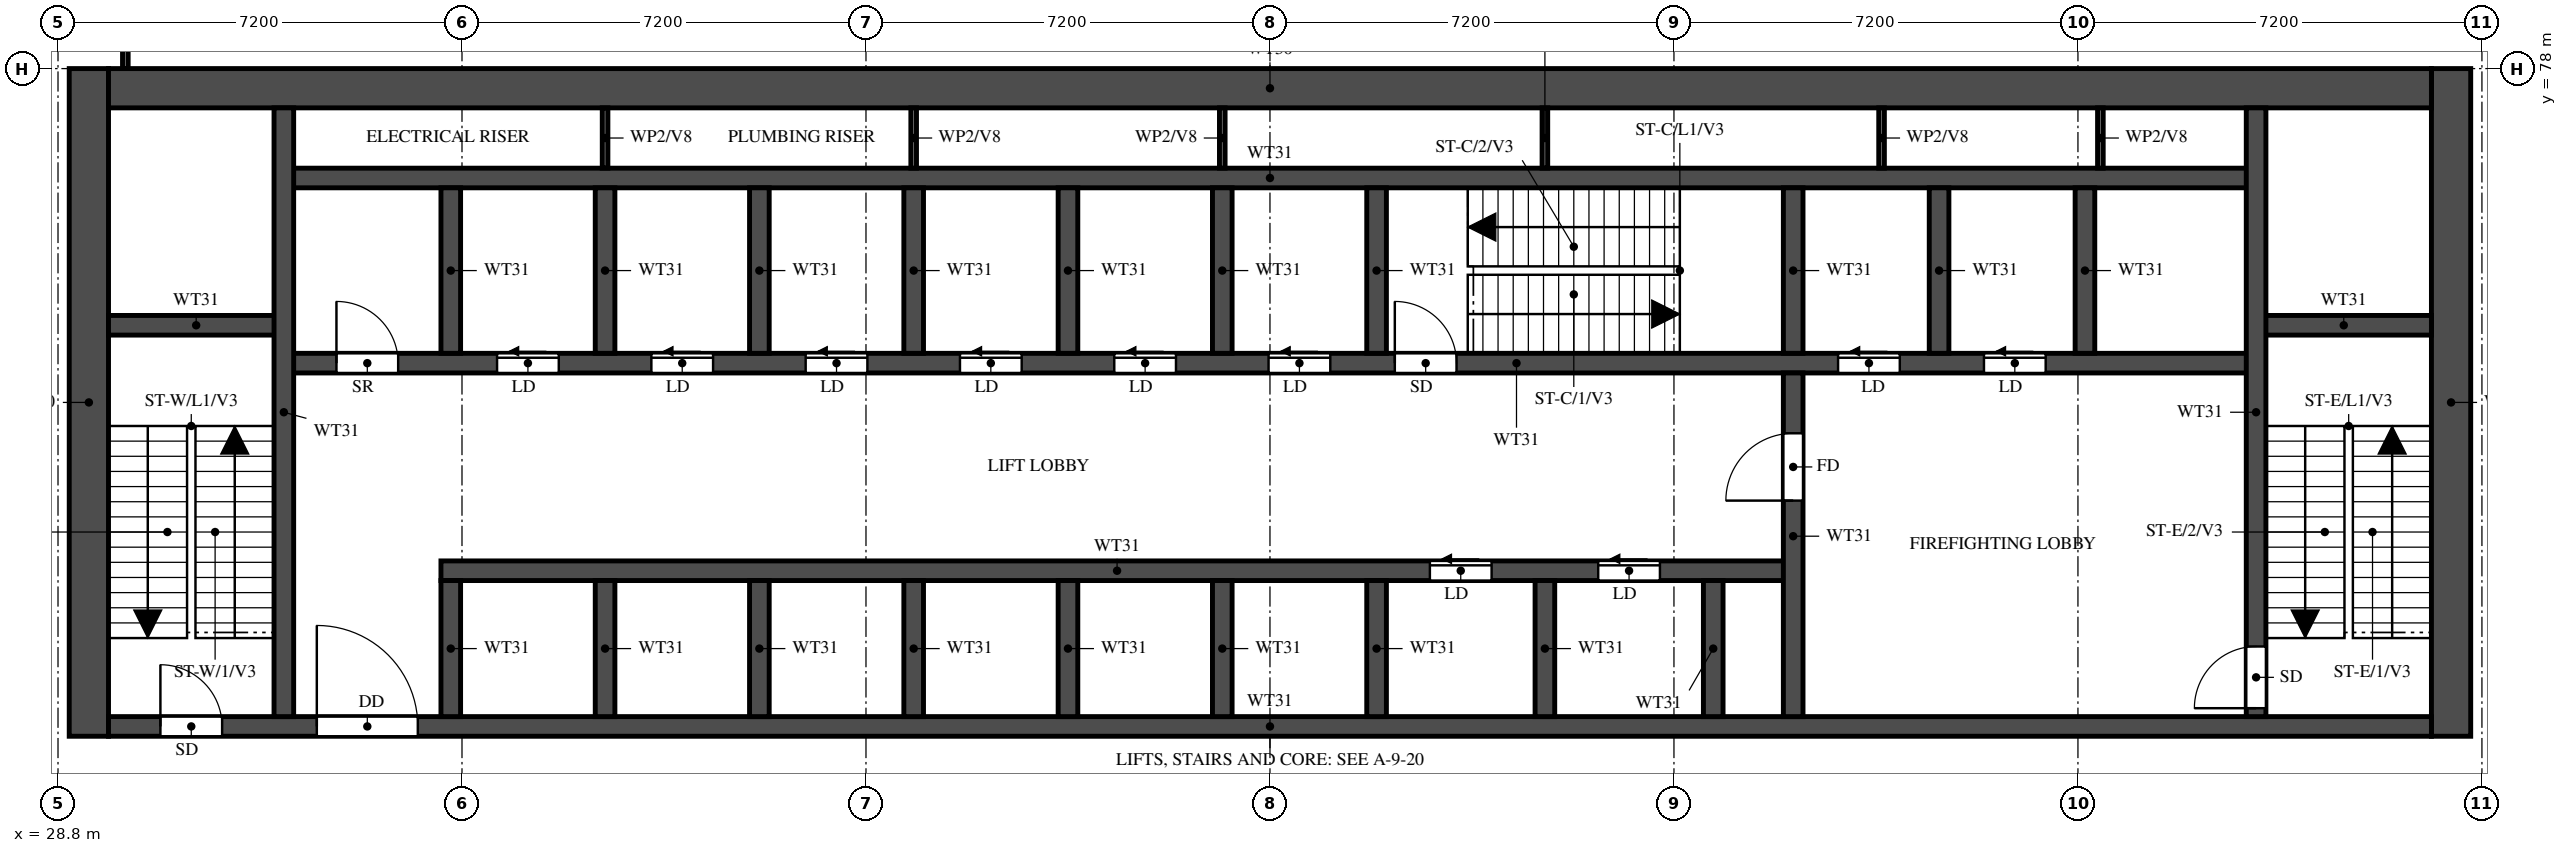
"""IFC4 building model, lengths in metres.
Left out: names, types, materials, properties, quantities, classifications, styles, units other than length and angle.
Written with IfcOpenShell. Run it as: python <this file> out.ifc"""

import sys

from ifc_helpers import new_model, si_unit, direction, frame, frame_2d, origin, place, context, subcontext, project, spatial, rectangle, extrude, element, fill, save


model = new_model("IFC4")
c1 = context("Model", 3, precision=1e-05, world=origin(), true_north=direction((0.0, 1.0)))
c2 = subcontext(c1, "Body", "Model", "MODEL_VIEW")
j1 = project(units=[si_unit("LENGTHUNIT", "METRE"), si_unit("PLANEANGLEUNIT", "RADIAN")], contexts=[c1])
p1 = place(None, origin())
s1 = spatial("IfcSite", under=j1, at=p1, CompositionType="ELEMENT")
p2 = place(p1, origin())
s2 = spatial("IfcBuilding", under=s1, at=p2, CompositionType="ELEMENT")
p3 = place(p2, frame((0.0, 0.0, 137.5)))
s3 = spatial("IfcBuildingStorey", under=s2, at=p3, CompositionType="ELEMENT", Elevation=137.5)
for number, where, z_axis, x_axis in (
    (1, (29.35, 66.1, 0.0), (0.0, 0.0, 1.0), (0.0, 1.0, 0.0)),
    (2, (71.45, 66.1, 0.0), (0.0, 0.0, 1.0), (0.0, 1.0, 0.0)),
):
    element("IfcWall", number, at=place(p3, frame(where, z_axis=z_axis, x_axis=x_axis)), inside=s3, PredefinedType="SHEAR", context=c2, shape_type="SweptSolid", body=[
        extrude(rectangle(XDim=11.9, YDim=0.7, at=frame_2d((5.95, 0.0))), origin(), (0.0, 0.0, 1.0), 5.2),
    ])
p4 = place(p3, frame((29.7, 77.65, 0.0), z_axis=(0.0, 0.0, 1.0), x_axis=(1.0, 0.0, 0.0)))
e3 = element("IfcWall", 3, at=p4, inside=s3, PredefinedType="SHEAR", context=c2, shape_type="SweptSolid", body=[
    extrude(rectangle(XDim=41.4, YDim=0.7, at=frame_2d((20.7, 0.0))), origin(), (0.0, 0.0, 1.0), 5.2),
])
p5 = place(p3, frame((29.7, 66.275, 0.0), z_axis=(0.0, 0.0, 1.0), x_axis=(1.0, 0.0, 0.0)))
e4 = element("IfcWall", 4, at=p5, inside=s3, PredefinedType="SHEAR", context=c2, shape_type="SweptSolid", body=[
    extrude(rectangle(XDim=41.4, YDim=0.35, at=frame_2d((20.7, 0.0))), origin(), (0.0, 0.0, 1.0), 5.2),
])
p6 = place(p5, frame((0.925, 0.0, 0.0)))
e5 = element("IfcOpeningElement", 5, at=p6, cuts=e4, PredefinedType="OPENING", context=c2, shape_type="SweptSolid", body=[
    extrude(rectangle(XDim=1.1, YDim=2.1, at=frame_2d((0.55, 1.05))), frame((0.0, 0.185, 0.0), z_axis=(0.0, -1.0, 0.0), x_axis=(1.0, 0.0, 0.0)), (0.0, 0.0, 1.0), 0.37),
])
p7 = place(p5, frame((3.712, 0.0, 0.0)))
e6 = element("IfcOpeningElement", 6, at=p7, cuts=e4, PredefinedType="OPENING", context=c2, shape_type="SweptSolid", body=[
    extrude(rectangle(XDim=1.8, YDim=2.1, at=frame_2d((0.9, 1.05))), frame((0.0, 0.185, 0.0), z_axis=(0.0, -1.0, 0.0), x_axis=(1.0, 0.0, 0.0)), (0.0, 0.0, 1.0), 0.37),
])
p8 = place(p3, frame((35.625, 69.05, 0.0), z_axis=(0.0, 0.0, 1.0), x_axis=(1.0, 0.0, 0.0)))
e7 = element("IfcWall", 7, at=p8, inside=s3, PredefinedType="SHEAR", context=c2, shape_type="SweptSolid", body=[
    extrude(rectangle(XDim=24.1, YDim=0.35, at=frame_2d((12.05, 0.0))), origin(), (0.0, 0.0, 1.0), 5.2),
])
p9 = place(p8, frame((17.625, 0.0, 0.0)))
e8 = element("IfcOpeningElement", 8, at=p9, cuts=e7, PredefinedType="OPENING", context=c2, shape_type="SweptSolid", body=[
    extrude(rectangle(XDim=1.1, YDim=2.1, at=frame_2d((0.55, 1.05))), frame((0.0, 0.185, 0.0), z_axis=(0.0, -1.0, 0.0), x_axis=(1.0, 0.0, 0.0)), (0.0, 0.0, 1.0), 0.37),
])
p10 = place(p8, frame((20.625, 0.0, 0.0)))
e9 = element("IfcOpeningElement", 9, at=p10, cuts=e7, PredefinedType="OPENING", context=c2, shape_type="SweptSolid", body=[
    extrude(rectangle(XDim=1.1, YDim=2.1, at=frame_2d((0.55, 1.05))), frame((0.0, 0.185, 0.0), z_axis=(0.0, -1.0, 0.0), x_axis=(1.0, 0.0, 0.0)), (0.0, 0.0, 1.0), 0.37),
])
p11 = place(p3, frame((32.825, 72.75, 0.0), z_axis=(0.0, 0.0, 1.0), x_axis=(1.0, 0.0, 0.0)))
e10 = element("IfcWall", 10, at=p11, inside=s3, PredefinedType="SHEAR", context=c2, shape_type="SweptSolid", body=[
    extrude(rectangle(XDim=35.15, YDim=0.35, at=frame_2d((17.575, 0.0))), origin(), (0.0, 0.0, 1.0), 5.2),
])
p12 = place(p11, frame((19.8, 0.0, 0.0)))
e11 = element("IfcOpeningElement", 11, at=p12, cuts=e10, PredefinedType="OPENING", context=c2, shape_type="SweptSolid", body=[
    extrude(rectangle(XDim=1.1, YDim=2.1, at=frame_2d((0.55, 1.05))), frame((0.0, 0.185, 0.0), z_axis=(0.0, -1.0, 0.0), x_axis=(1.0, 0.0, 0.0)), (0.0, 0.0, 1.0), 0.37),
])
p13 = place(p11, frame((27.7, 0.0, 0.0)))
e12 = element("IfcOpeningElement", 12, at=p13, cuts=e10, PredefinedType="OPENING", context=c2, shape_type="SweptSolid", body=[
    extrude(rectangle(XDim=1.1, YDim=2.1, at=frame_2d((0.55, 1.05))), frame((0.0, 0.185, 0.0), z_axis=(0.0, -1.0, 0.0), x_axis=(1.0, 0.0, 0.0)), (0.0, 0.0, 1.0), 0.37),
])
p14 = place(p11, frame((30.3, 0.0, 0.0)))
e13 = element("IfcOpeningElement", 13, at=p14, cuts=e10, PredefinedType="OPENING", context=c2, shape_type="SweptSolid", body=[
    extrude(rectangle(XDim=1.1, YDim=2.1, at=frame_2d((0.55, 1.05))), frame((0.0, 0.185, 0.0), z_axis=(0.0, -1.0, 0.0), x_axis=(1.0, 0.0, 0.0)), (0.0, 0.0, 1.0), 0.37),
])
p15 = place(p11, frame((3.8, 0.0, 0.0)))
e14 = element("IfcOpeningElement", 14, at=p15, cuts=e10, PredefinedType="OPENING", context=c2, shape_type="SweptSolid", body=[
    extrude(rectangle(XDim=1.1, YDim=2.1, at=frame_2d((0.55, 1.05))), frame((0.0, 0.185, 0.0), z_axis=(0.0, -1.0, 0.0), x_axis=(1.0, 0.0, 0.0)), (0.0, 0.0, 1.0), 0.37),
])
p16 = place(p11, frame((6.55, 0.0, 0.0)))
e15 = element("IfcOpeningElement", 15, at=p16, cuts=e10, PredefinedType="OPENING", context=c2, shape_type="SweptSolid", body=[
    extrude(rectangle(XDim=1.1, YDim=2.1, at=frame_2d((0.55, 1.05))), frame((0.0, 0.185, 0.0), z_axis=(0.0, -1.0, 0.0), x_axis=(1.0, 0.0, 0.0)), (0.0, 0.0, 1.0), 0.37),
])
p17 = place(p11, frame((9.3, 0.0, 0.0)))
e16 = element("IfcOpeningElement", 16, at=p17, cuts=e10, PredefinedType="OPENING", context=c2, shape_type="SweptSolid", body=[
    extrude(rectangle(XDim=1.1, YDim=2.1, at=frame_2d((0.55, 1.05))), frame((0.0, 0.185, 0.0), z_axis=(0.0, -1.0, 0.0), x_axis=(1.0, 0.0, 0.0)), (0.0, 0.0, 1.0), 0.37),
])
p18 = place(p11, frame((12.05, 0.0, 0.0)))
e17 = element("IfcOpeningElement", 17, at=p18, cuts=e10, PredefinedType="OPENING", context=c2, shape_type="SweptSolid", body=[
    extrude(rectangle(XDim=1.1, YDim=2.1, at=frame_2d((0.55, 1.05))), frame((0.0, 0.185, 0.0), z_axis=(0.0, -1.0, 0.0), x_axis=(1.0, 0.0, 0.0)), (0.0, 0.0, 1.0), 0.37),
])
p19 = place(p11, frame((14.8, 0.0, 0.0)))
e18 = element("IfcOpeningElement", 18, at=p19, cuts=e10, PredefinedType="OPENING", context=c2, shape_type="SweptSolid", body=[
    extrude(rectangle(XDim=1.1, YDim=2.1, at=frame_2d((0.55, 1.05))), frame((0.0, 0.185, 0.0), z_axis=(0.0, -1.0, 0.0), x_axis=(1.0, 0.0, 0.0)), (0.0, 0.0, 1.0), 0.37),
])
p20 = place(p11, frame((17.55, 0.0, 0.0)))
e19 = element("IfcOpeningElement", 19, at=p20, cuts=e10, PredefinedType="OPENING", context=c2, shape_type="SweptSolid", body=[
    extrude(rectangle(XDim=1.1, YDim=2.1, at=frame_2d((0.55, 1.05))), frame((0.0, 0.185, 0.0), z_axis=(0.0, -1.0, 0.0), x_axis=(1.0, 0.0, 0.0)), (0.0, 0.0, 1.0), 0.37),
])
p21 = place(p11, frame((0.938, 0.0, 0.0)))
e20 = element("IfcOpeningElement", 20, at=p21, cuts=e10, PredefinedType="OPENING", context=c2, shape_type="SweptSolid", body=[
    extrude(rectangle(XDim=1.1, YDim=2.1, at=frame_2d((0.55, 1.05))), frame((0.0, 0.185, 0.0), z_axis=(0.0, -1.0, 0.0), x_axis=(1.0, 0.0, 0.0)), (0.0, 0.0, 1.0), 0.37),
])
p22 = place(p3, frame((32.825, 76.05, 0.0), z_axis=(0.0, 0.0, 1.0), x_axis=(1.0, 0.0, 0.0)))
e21 = element("IfcWall", 21, at=p22, inside=s3, PredefinedType="SHEAR", context=c2, shape_type="SweptSolid", body=[
    extrude(rectangle(XDim=35.15, YDim=0.35, at=frame_2d((17.575, 0.0))), origin(), (0.0, 0.0, 1.0), 5.2),
])
for number, where, z_axis, x_axis in (
    (22, (29.7, 73.425, 0.0), (0.0, 0.0, 1.0), (1.0, 0.0, 0.0)),
    (23, (67.975, 73.425, 0.0), (0.0, 0.0, 1.0), (1.0, 0.0, 0.0)),
):
    element("IfcWall", number, at=place(p3, frame(where, z_axis=z_axis, x_axis=x_axis)), inside=s3, PredefinedType="SHEAR", context=c2, shape_type="SweptSolid", body=[
        extrude(rectangle(XDim=3.125, YDim=0.35, at=frame_2d((1.562, 0.0))), origin(), (0.0, 0.0, 1.0), 5.2),
    ])
p23 = place(p3, frame((32.825, 66.45, 0.0), z_axis=(0.0, 0.0, 1.0), x_axis=(0.0, 1.0, 0.0)))
e24 = element("IfcWall", 24, at=p23, inside=s3, PredefinedType="SHEAR", context=c2, shape_type="SweptSolid", body=[
    extrude(rectangle(XDim=10.85, YDim=0.35, at=frame_2d((5.425, 0.0))), origin(), (0.0, 0.0, 1.0), 5.2),
])
p24 = place(p3, frame((67.975, 66.45, 0.0), z_axis=(0.0, 0.0, 1.0), x_axis=(0.0, 1.0, 0.0)))
e25 = element("IfcWall", 25, at=p24, inside=s3, PredefinedType="SHEAR", context=c2, shape_type="SweptSolid", body=[
    extrude(rectangle(XDim=10.85, YDim=0.35, at=frame_2d((5.425, 0.0))), origin(), (0.0, 0.0, 1.0), 5.2),
])
p25 = place(p24, frame((0.15, 0.0, 0.0)))
e26 = element("IfcOpeningElement", 26, at=p25, cuts=e25, PredefinedType="OPENING", context=c2, shape_type="SweptSolid", body=[
    extrude(rectangle(XDim=1.1, YDim=2.1, at=frame_2d((0.55, 1.05))), frame((0.0, 0.185, 0.0), z_axis=(0.0, -1.0, 0.0), x_axis=(1.0, 0.0, 0.0)), (0.0, 0.0, 1.0), 0.37),
])
p26 = place(p3, frame((59.725, 66.45, 0.0), z_axis=(0.0, 0.0, 1.0), x_axis=(0.0, 1.0, 0.0)))
e27 = element("IfcWall", 27, at=p26, inside=s3, PredefinedType="SHEAR", context=c2, shape_type="SweptSolid", body=[
    extrude(rectangle(XDim=6.125, YDim=0.35, at=frame_2d((3.062, 0.0))), origin(), (0.0, 0.0, 1.0), 5.2),
])
p27 = place(p26, frame((3.85, 0.0, 0.0)))
e28 = element("IfcOpeningElement", 28, at=p27, cuts=e27, PredefinedType="OPENING", context=c2, shape_type="SweptSolid", body=[
    extrude(rectangle(XDim=1.2, YDim=2.1, at=frame_2d((0.6, 1.05))), frame((0.0, 0.185, 0.0), z_axis=(0.0, -1.0, 0.0), x_axis=(1.0, 0.0, 0.0)), (0.0, 0.0, 1.0), 0.37),
])
p28 = place(p3, frame((59.725, 72.925, 0.0), z_axis=(0.0, 0.0, 1.0), x_axis=(0.0, 1.0, 0.0)))
e29 = element("IfcWall", 29, at=p28, inside=s3, PredefinedType="SHEAR", context=c2, shape_type="SweptSolid", body=[
    extrude(rectangle(XDim=2.95, YDim=0.35, at=frame_2d((1.475, 0.0))), origin(), (0.0, 0.0, 1.0), 5.2),
])
for number, where, z_axis, x_axis in (
    (30, (35.8, 66.45, 0.0), (0.0, 0.0, 1.0), (0.0, 1.0, 0.0)),
    (31, (38.55, 66.45, 0.0), (0.0, 0.0, 1.0), (0.0, 1.0, 0.0)),
    (32, (41.3, 66.45, 0.0), (0.0, 0.0, 1.0), (0.0, 1.0, 0.0)),
    (33, (44.05, 66.45, 0.0), (0.0, 0.0, 1.0), (0.0, 1.0, 0.0)),
    (34, (46.8, 66.45, 0.0), (0.0, 0.0, 1.0), (0.0, 1.0, 0.0)),
    (35, (49.55, 66.45, 0.0), (0.0, 0.0, 1.0), (0.0, 1.0, 0.0)),
    (36, (52.3, 66.45, 0.0), (0.0, 0.0, 1.0), (0.0, 1.0, 0.0)),
    (37, (55.3, 66.45, 0.0), (0.0, 0.0, 1.0), (0.0, 1.0, 0.0)),
    (38, (58.3, 66.45, 0.0), (0.0, 0.0, 1.0), (0.0, 1.0, 0.0)),
):
    element("IfcWall", number, at=place(p3, frame(where, z_axis=z_axis, x_axis=x_axis)), inside=s3, PredefinedType="SHEAR", context=c2, shape_type="SweptSolid", body=[
        extrude(rectangle(XDim=2.425, YDim=0.35, at=frame_2d((1.212, 0.0))), origin(), (0.0, 0.0, 1.0), 5.2),
    ])
for number, where, z_axis, x_axis in (
    (39, (35.8, 72.925, 0.0), (0.0, 0.0, 1.0), (0.0, 1.0, 0.0)),
    (40, (38.55, 72.925, 0.0), (0.0, 0.0, 1.0), (0.0, 1.0, 0.0)),
    (41, (41.3, 72.925, 0.0), (0.0, 0.0, 1.0), (0.0, 1.0, 0.0)),
    (42, (44.05, 72.925, 0.0), (0.0, 0.0, 1.0), (0.0, 1.0, 0.0)),
    (43, (46.8, 72.925, 0.0), (0.0, 0.0, 1.0), (0.0, 1.0, 0.0)),
    (44, (49.55, 72.925, 0.0), (0.0, 0.0, 1.0), (0.0, 1.0, 0.0)),
    (45, (52.3, 72.925, 0.0), (0.0, 0.0, 1.0), (0.0, 1.0, 0.0)),
    (46, (62.325, 72.925, 0.0), (0.0, 0.0, 1.0), (0.0, 1.0, 0.0)),
    (47, (64.925, 72.925, 0.0), (0.0, 0.0, 1.0), (0.0, 1.0, 0.0)),
):
    element("IfcWall", number, at=place(p3, frame(where, z_axis=z_axis, x_axis=x_axis)), inside=s3, PredefinedType="SHEAR", context=c2, shape_type="SweptSolid", body=[
        extrude(rectangle(XDim=2.95, YDim=0.35, at=frame_2d((1.475, 0.0))), origin(), (0.0, 0.0, 1.0), 5.2),
    ])
for number, where, z_axis, x_axis in (
    (48, (38.55, 76.225, 0.0), (0.0, 0.0, 1.0), (0.0, 1.0, 0.0)),
    (49, (44.05, 76.225, 0.0), (0.0, 0.0, 1.0), (0.0, 1.0, 0.0)),
    (50, (49.55, 76.225, 0.0), (0.0, 0.0, 1.0), (0.0, 1.0, 0.0)),
    (51, (55.3, 76.225, 0.0), (0.0, 0.0, 1.0), (0.0, 1.0, 0.0)),
    (52, (61.3, 76.225, 0.0), (0.0, 0.0, 1.0), (0.0, 1.0, 0.0)),
    (53, (65.2, 76.225, 0.0), (0.0, 0.0, 1.0), (0.0, 1.0, 0.0)),
):
    element("IfcWall", number, at=place(p3, frame(where, z_axis=z_axis, x_axis=x_axis)), inside=s3, PredefinedType="PARTITIONING", context=c2, shape_type="SweptSolid", body=[
        extrude(rectangle(XDim=1.075, YDim=0.1, at=frame_2d((0.538, 0.0))), origin(), (0.0, 0.0, 1.0), 5.2),
    ])
p29 = place(p3, frame((30.0, 78.002, 0.0), z_axis=(0.0, 0.0, 1.0), x_axis=(0.0, 1.0, 0.0)))
e54 = element("IfcWall", 54, at=p29, inside=s3, PredefinedType="PARTITIONING", context=c2, shape_type="SweptSolid", body=[
    extrude(rectangle(XDim=2.228, YDim=0.1, at=frame_2d((1.114, 0.0))), origin(), (0.0, 0.0, 1.0), 4.3),
])
p30 = place(p6, origin())
e55 = element("IfcDoor", 55, at=p30, inside=s3, OperationType="SINGLE_SWING_LEFT", PredefinedType="DOOR", context=c2, shape_type="SweptSolid", body=[
    extrude(rectangle(XDim=1.1, YDim=2.1, at=frame_2d((0.55, 1.05))), frame((0.0, 0.025, 0.0), z_axis=(0.0, -1.0, 0.0), x_axis=(1.0, 0.0, 0.0)), (0.0, 0.0, 1.0), 0.05),
])
fill(e5, e55)
p31 = place(p12, origin())
e56 = element("IfcDoor", 56, at=p31, inside=s3, OperationType="SINGLE_SWING_LEFT", PredefinedType="DOOR", context=c2, shape_type="SweptSolid", body=[
    extrude(rectangle(XDim=1.1, YDim=2.1, at=frame_2d((0.55, 1.05))), frame((0.0, 0.025, 0.0), z_axis=(0.0, -1.0, 0.0), x_axis=(1.0, 0.0, 0.0)), (0.0, 0.0, 1.0), 0.05),
])
fill(e11, e56)
p32 = place(p25, origin())
e57 = element("IfcDoor", 57, at=p32, inside=s3, OperationType="SINGLE_SWING_LEFT", PredefinedType="DOOR", context=c2, shape_type="SweptSolid", body=[
    extrude(rectangle(XDim=1.1, YDim=2.1, at=frame_2d((0.55, 1.05))), frame((0.0, 0.025, 0.0), z_axis=(0.0, -1.0, 0.0), x_axis=(1.0, 0.0, 0.0)), (0.0, 0.0, 1.0), 0.05),
])
fill(e26, e57)
p33 = place(p7, origin())
e58 = element("IfcDoor", 58, at=p33, inside=s3, OperationType="DOUBLE_DOOR_SINGLE_SWING", PredefinedType="DOOR", context=c2, shape_type="SweptSolid", body=[
    extrude(rectangle(XDim=1.8, YDim=2.1, at=frame_2d((0.9, 1.05))), frame((0.0, 0.025, 0.0), z_axis=(0.0, -1.0, 0.0), x_axis=(1.0, 0.0, 0.0)), (0.0, 0.0, 1.0), 0.05),
])
fill(e6, e58)
p34 = place(p27, origin())
e59 = element("IfcDoor", 59, at=p34, inside=s3, OperationType="SINGLE_SWING_LEFT", PredefinedType="DOOR", context=c2, shape_type="SweptSolid", body=[
    extrude(rectangle(XDim=1.2, YDim=2.1, at=frame_2d((0.6, 1.05))), frame((0.0, 0.025, 0.0), z_axis=(0.0, -1.0, 0.0), x_axis=(1.0, 0.0, 0.0)), (0.0, 0.0, 1.0), 0.05),
])
fill(e28, e59)
p35 = place(p13, origin())
e60 = element("IfcDoor", 60, at=p35, inside=s3, OperationType="SLIDING_TO_LEFT", PredefinedType="DOOR", context=c2, shape_type="SweptSolid", body=[
    extrude(rectangle(XDim=1.1, YDim=2.1, at=frame_2d((0.55, 1.05))), frame((0.0, 0.025, 0.0), z_axis=(0.0, -1.0, 0.0), x_axis=(1.0, 0.0, 0.0)), (0.0, 0.0, 1.0), 0.05),
])
fill(e12, e60)
p36 = place(p14, origin())
e61 = element("IfcDoor", 61, at=p36, inside=s3, OperationType="SLIDING_TO_LEFT", PredefinedType="DOOR", context=c2, shape_type="SweptSolid", body=[
    extrude(rectangle(XDim=1.1, YDim=2.1, at=frame_2d((0.55, 1.05))), frame((0.0, 0.025, 0.0), z_axis=(0.0, -1.0, 0.0), x_axis=(1.0, 0.0, 0.0)), (0.0, 0.0, 1.0), 0.05),
])
fill(e13, e61)
p37 = place(p9, origin())
e62 = element("IfcDoor", 62, at=p37, inside=s3, OperationType="SLIDING_TO_LEFT", PredefinedType="DOOR", context=c2, shape_type="SweptSolid", body=[
    extrude(rectangle(XDim=1.1, YDim=2.1, at=frame_2d((0.55, 1.05))), frame((0.0, 0.025, 0.0), z_axis=(0.0, -1.0, 0.0), x_axis=(1.0, 0.0, 0.0)), (0.0, 0.0, 1.0), 0.05),
])
fill(e8, e62)
p38 = place(p10, origin())
e63 = element("IfcDoor", 63, at=p38, inside=s3, OperationType="SLIDING_TO_LEFT", PredefinedType="DOOR", context=c2, shape_type="SweptSolid", body=[
    extrude(rectangle(XDim=1.1, YDim=2.1, at=frame_2d((0.55, 1.05))), frame((0.0, 0.025, 0.0), z_axis=(0.0, -1.0, 0.0), x_axis=(1.0, 0.0, 0.0)), (0.0, 0.0, 1.0), 0.05),
])
fill(e9, e63)
p39 = place(p15, origin())
e64 = element("IfcDoor", 64, at=p39, inside=s3, OperationType="SLIDING_TO_LEFT", PredefinedType="DOOR", context=c2, shape_type="SweptSolid", body=[
    extrude(rectangle(XDim=1.1, YDim=2.1, at=frame_2d((0.55, 1.05))), frame((0.0, 0.025, 0.0), z_axis=(0.0, -1.0, 0.0), x_axis=(1.0, 0.0, 0.0)), (0.0, 0.0, 1.0), 0.05),
])
fill(e14, e64)
p40 = place(p16, origin())
e65 = element("IfcDoor", 65, at=p40, inside=s3, OperationType="SLIDING_TO_LEFT", PredefinedType="DOOR", context=c2, shape_type="SweptSolid", body=[
    extrude(rectangle(XDim=1.1, YDim=2.1, at=frame_2d((0.55, 1.05))), frame((0.0, 0.025, 0.0), z_axis=(0.0, -1.0, 0.0), x_axis=(1.0, 0.0, 0.0)), (0.0, 0.0, 1.0), 0.05),
])
fill(e15, e65)
p41 = place(p17, origin())
e66 = element("IfcDoor", 66, at=p41, inside=s3, OperationType="SLIDING_TO_LEFT", PredefinedType="DOOR", context=c2, shape_type="SweptSolid", body=[
    extrude(rectangle(XDim=1.1, YDim=2.1, at=frame_2d((0.55, 1.05))), frame((0.0, 0.025, 0.0), z_axis=(0.0, -1.0, 0.0), x_axis=(1.0, 0.0, 0.0)), (0.0, 0.0, 1.0), 0.05),
])
fill(e16, e66)
p42 = place(p18, origin())
e67 = element("IfcDoor", 67, at=p42, inside=s3, OperationType="SLIDING_TO_LEFT", PredefinedType="DOOR", context=c2, shape_type="SweptSolid", body=[
    extrude(rectangle(XDim=1.1, YDim=2.1, at=frame_2d((0.55, 1.05))), frame((0.0, 0.025, 0.0), z_axis=(0.0, -1.0, 0.0), x_axis=(1.0, 0.0, 0.0)), (0.0, 0.0, 1.0), 0.05),
])
fill(e17, e67)
p43 = place(p19, origin())
e68 = element("IfcDoor", 68, at=p43, inside=s3, OperationType="SLIDING_TO_LEFT", PredefinedType="DOOR", context=c2, shape_type="SweptSolid", body=[
    extrude(rectangle(XDim=1.1, YDim=2.1, at=frame_2d((0.55, 1.05))), frame((0.0, 0.025, 0.0), z_axis=(0.0, -1.0, 0.0), x_axis=(1.0, 0.0, 0.0)), (0.0, 0.0, 1.0), 0.05),
])
fill(e18, e68)
p44 = place(p20, origin())
e69 = element("IfcDoor", 69, at=p44, inside=s3, OperationType="SLIDING_TO_LEFT", PredefinedType="DOOR", context=c2, shape_type="SweptSolid", body=[
    extrude(rectangle(XDim=1.1, YDim=2.1, at=frame_2d((0.55, 1.05))), frame((0.0, 0.025, 0.0), z_axis=(0.0, -1.0, 0.0), x_axis=(1.0, 0.0, 0.0)), (0.0, 0.0, 1.0), 0.05),
])
fill(e19, e69)
p45 = place(p21, origin())
e70 = element("IfcDoor", 70, at=p45, inside=s3, OperationType="SINGLE_SWING_LEFT", PredefinedType="DOOR", context=c2, shape_type="SweptSolid", body=[
    extrude(rectangle(XDim=1.1, YDim=2.1, at=frame_2d((0.55, 1.05))), frame((0.0, 0.025, 0.0), z_axis=(0.0, -1.0, 0.0), x_axis=(1.0, 0.0, 0.0)), (0.0, 0.0, 1.0), 0.05),
])
fill(e20, e70)
save(model, sys.argv[1])
